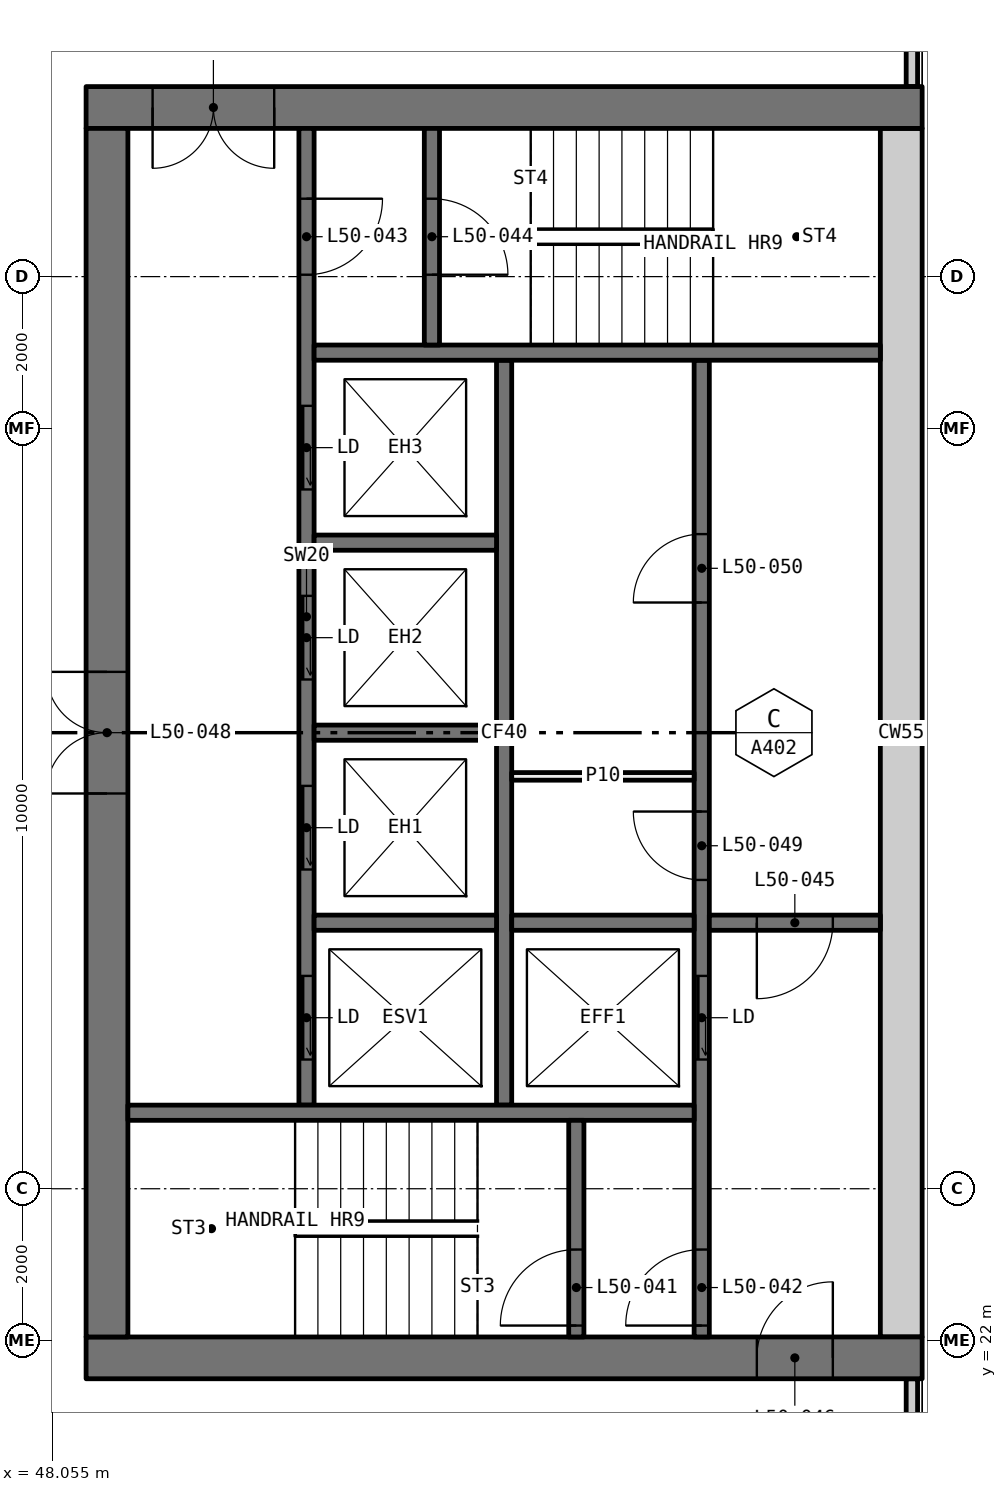
"""IFC4 building model, lengths in metres.
Left out: names, types, materials, properties, quantities, classifications, styles, units other than length and angle.
Written with IfcOpenShell. Run it as: python <this file> out.ifc"""

import sys

from ifc_helpers import new_model, si_unit, direction, frame, frame_2d, origin, place, context, subcontext, project, spatial, rectangle, extrude, element, fill, save


model = new_model("IFC4")
c1 = context("Model", 3, precision=1e-05, world=origin(), true_north=direction((0.0, 1.0)))
c2 = subcontext(c1, "Body", "Model", "MODEL_VIEW")
j1 = project(units=[si_unit("LENGTHUNIT", "METRE"), si_unit("PLANEANGLEUNIT", "RADIAN")], contexts=[c1])
p1 = place(None, origin())
s1 = spatial("IfcSite", under=j1, at=p1, CompositionType="ELEMENT")
p2 = place(p1, origin())
s2 = spatial("IfcBuilding", under=s1, at=p2, CompositionType="ELEMENT")
p3 = place(p2, frame((0.0, 0.0, 189.3)))
s3 = spatial("IfcBuildingStorey", under=s2, at=p3, CompositionType="ELEMENT", Elevation=189.3)
for number, where, z_axis, x_axis in (
    (1, (59.365, 18.71, 0.0), (0.0, 0.0, 1.0), (0.0, 1.0, 0.0)),
    (2, (59.365, 38.5, 0.0), (0.0, 0.0, 1.0), (0.0, 1.0, 0.0)),
):
    element("IfcWall", number, at=place(p3, frame(where, z_axis=z_axis, x_axis=x_axis)), inside=s3, PredefinedType="ELEMENTEDWALL", context=c2, shape_type="SweptSolid", body=[
        extrude(rectangle(XDim=2.79, YDim=0.15, at=frame_2d((1.395, 0.0))), origin(), (0.0, 0.0, 1.0), 3.05),
    ])
p4 = place(p3, frame((59.5, 21.775, 0.0), z_axis=(0.0, 0.0, 1.0), x_axis=(-1.0, 0.0, 0.0)))
e3 = element("IfcWall", 3, at=p4, inside=s3, PredefinedType="SHEAR", context=c2, shape_type="SweptSolid", body=[
    extrude(rectangle(XDim=11.0, YDim=0.55, at=frame_2d((5.5, 0.0))), origin(), (0.0, 0.0, 1.0), 3.05),
])
p5 = place(p4, frame((1.175, 0.0, 0.0)))
e4 = element("IfcOpeningElement", 4, at=p5, cuts=e3, PredefinedType="OPENING", context=c2, shape_type="SweptSolid", body=[
    extrude(rectangle(XDim=1.0, YDim=2.1, at=frame_2d((0.5, 1.05))), frame((0.0, 0.285, 0.0), z_axis=(0.0, -1.0, 0.0), x_axis=(1.0, 0.0, 0.0)), (0.0, 0.0, 1.0), 0.57),
])
p6 = place(p3, frame((59.5, 38.225, 0.0), z_axis=(0.0, 0.0, 1.0), x_axis=(-1.0, 0.0, 0.0)))
e5 = element("IfcWall", 5, at=p6, inside=s3, PredefinedType="SHEAR", context=c2, shape_type="SweptSolid", body=[
    extrude(rectangle(XDim=11.0, YDim=0.55, at=frame_2d((5.5, 0.0))), origin(), (0.0, 0.0, 1.0), 3.05),
])
p7 = place(p6, frame((8.525, 0.0, 0.0)))
e6 = element("IfcOpeningElement", 6, at=p7, cuts=e5, PredefinedType="OPENING", context=c2, shape_type="SweptSolid", body=[
    extrude(rectangle(XDim=1.6, YDim=2.1, at=frame_2d((0.8, 1.05))), frame((0.0, 0.285, 0.0), z_axis=(0.0, -1.0, 0.0), x_axis=(1.0, 0.0, 0.0)), (0.0, 0.0, 1.0), 0.57),
])
p8 = place(p3, frame((59.225, 22.05, 0.0), z_axis=(0.0, 0.0, 1.0), x_axis=(0.0, 1.0, 0.0)))
e7 = element("IfcWall", 7, at=p8, inside=s3, PredefinedType="SHEAR", context=c2, shape_type="SweptSolid", body=[
    extrude(rectangle(XDim=15.9, YDim=0.55, at=frame_2d((7.95, 0.0))), origin(), (0.0, 0.0, 1.0), 3.05),
])
p9 = place(p3, frame((48.775, 22.05, 0.0), z_axis=(0.0, 0.0, 1.0), x_axis=(0.0, 1.0, 0.0)))
e8 = element("IfcWall", 8, at=p9, inside=s3, PredefinedType="SHEAR", context=c2, shape_type="SweptSolid", body=[
    extrude(rectangle(XDim=15.9, YDim=0.55, at=frame_2d((7.95, 0.0))), origin(), (0.0, 0.0, 1.0), 3.05),
])
p10 = place(p9, frame((7.15, 0.0, 0.0)))
e9 = element("IfcOpeningElement", 9, at=p10, cuts=e8, PredefinedType="OPENING", context=c2, shape_type="SweptSolid", body=[
    extrude(rectangle(XDim=1.6, YDim=2.1, at=frame_2d((0.8, 1.05))), frame((0.0, 0.285, 0.0), z_axis=(0.0, -1.0, 0.0), x_axis=(1.0, 0.0, 0.0)), (0.0, 0.0, 1.0), 0.57),
])
p11 = place(p3, frame((56.6, 22.05, 0.0), z_axis=(0.0, 0.0, 1.0), x_axis=(0.0, 1.0, 0.0)))
e10 = element("IfcWall", 10, at=p11, inside=s3, PredefinedType="SOLIDWALL", context=c2, shape_type="SweptSolid", body=[
    extrude(rectangle(XDim=12.85, YDim=0.2, at=frame_2d((6.425, 0.0))), origin(), (0.0, 0.0, 1.0), 3.05),
])
p12 = place(p11, frame((3.65, 0.0, 0.0)))
e11 = element("IfcOpeningElement", 11, at=p12, cuts=e10, PredefinedType="OPENING", context=c2, shape_type="SweptSolid", body=[
    extrude(rectangle(XDim=1.1, YDim=2.1, at=frame_2d((0.55, 1.05))), frame((0.0, 0.11, 0.0), z_axis=(0.0, -1.0, 0.0), x_axis=(1.0, 0.0, 0.0)), (0.0, 0.0, 1.0), 0.22),
])
p13 = place(p11, frame((0.15, 0.0, 0.0)))
e12 = element("IfcOpeningElement", 12, at=p13, cuts=e10, PredefinedType="OPENING", context=c2, shape_type="SweptSolid", body=[
    extrude(rectangle(XDim=1.0, YDim=2.1, at=frame_2d((0.5, 1.05))), frame((0.0, 0.11, 0.0), z_axis=(0.0, -1.0, 0.0), x_axis=(1.0, 0.0, 0.0)), (0.0, 0.0, 1.0), 0.22),
])
p14 = place(p11, frame((6.012, 0.0, 0.0)))
e13 = element("IfcOpeningElement", 13, at=p14, cuts=e10, PredefinedType="OPENING", context=c2, shape_type="SweptSolid", body=[
    extrude(rectangle(XDim=0.9, YDim=2.1, at=frame_2d((0.45, 1.05))), frame((0.0, 0.11, 0.0), z_axis=(0.0, -1.0, 0.0), x_axis=(1.0, 0.0, 0.0)), (0.0, 0.0, 1.0), 0.22),
])
p15 = place(p11, frame((9.663, 0.0, 0.0)))
e14 = element("IfcOpeningElement", 14, at=p15, cuts=e10, PredefinedType="OPENING", context=c2, shape_type="SweptSolid", body=[
    extrude(rectangle(XDim=0.9, YDim=2.1, at=frame_2d((0.45, 1.05))), frame((0.0, 0.11, 0.0), z_axis=(0.0, -1.0, 0.0), x_axis=(1.0, 0.0, 0.0)), (0.0, 0.0, 1.0), 0.22),
])
p16 = place(p3, frame((51.4, 25.1, 0.0), z_axis=(0.0, 0.0, 1.0), x_axis=(0.0, 1.0, 0.0)))
e15 = element("IfcWall", 15, at=p16, inside=s3, PredefinedType="SOLIDWALL", context=c2, shape_type="SweptSolid", body=[
    extrude(rectangle(XDim=12.85, YDim=0.2, at=frame_2d((6.425, 0.0))), origin(), (0.0, 0.0, 1.0), 3.05),
])
p17 = place(p16, frame((0.6, 0.0, 0.0)))
e16 = element("IfcOpeningElement", 16, at=p17, cuts=e15, PredefinedType="OPENING", context=c2, shape_type="SweptSolid", body=[
    extrude(rectangle(XDim=1.1, YDim=2.1, at=frame_2d((0.55, 1.05))), frame((0.0, 0.11, 0.0), z_axis=(0.0, -1.0, 0.0), x_axis=(1.0, 0.0, 0.0)), (0.0, 0.0, 1.0), 0.22),
])
p18 = place(p16, frame((3.1, 0.0, 0.0)))
e17 = element("IfcOpeningElement", 17, at=p18, cuts=e15, PredefinedType="OPENING", context=c2, shape_type="SweptSolid", body=[
    extrude(rectangle(XDim=1.1, YDim=2.1, at=frame_2d((0.55, 1.05))), frame((0.0, 0.11, 0.0), z_axis=(0.0, -1.0, 0.0), x_axis=(1.0, 0.0, 0.0)), (0.0, 0.0, 1.0), 0.22),
])
p19 = place(p16, frame((5.6, 0.0, 0.0)))
e18 = element("IfcOpeningElement", 18, at=p19, cuts=e15, PredefinedType="OPENING", context=c2, shape_type="SweptSolid", body=[
    extrude(rectangle(XDim=1.1, YDim=2.1, at=frame_2d((0.55, 1.05))), frame((0.0, 0.11, 0.0), z_axis=(0.0, -1.0, 0.0), x_axis=(1.0, 0.0, 0.0)), (0.0, 0.0, 1.0), 0.22),
])
p20 = place(p16, frame((8.1, 0.0, 0.0)))
e19 = element("IfcOpeningElement", 19, at=p20, cuts=e15, PredefinedType="OPENING", context=c2, shape_type="SweptSolid", body=[
    extrude(rectangle(XDim=1.1, YDim=2.1, at=frame_2d((0.55, 1.05))), frame((0.0, 0.11, 0.0), z_axis=(0.0, -1.0, 0.0), x_axis=(1.0, 0.0, 0.0)), (0.0, 0.0, 1.0), 0.22),
])
p21 = place(p16, frame((10.925, 0.0, 0.0)))
e20 = element("IfcOpeningElement", 20, at=p21, cuts=e15, PredefinedType="OPENING", context=c2, shape_type="SweptSolid", body=[
    extrude(rectangle(XDim=1.0, YDim=2.1, at=frame_2d((0.5, 1.05))), frame((0.0, 0.11, 0.0), z_axis=(0.0, -1.0, 0.0), x_axis=(1.0, 0.0, 0.0)), (0.0, 0.0, 1.0), 0.22),
])
p22 = place(p3, frame((54.0, 25.1, 0.0), z_axis=(0.0, 0.0, 1.0), x_axis=(0.0, 1.0, 0.0)))
e21 = element("IfcWall", 21, at=p22, inside=s3, PredefinedType="SOLIDWALL", context=c2, shape_type="SweptSolid", body=[
    extrude(rectangle(XDim=9.8, YDim=0.2, at=frame_2d((4.9, 0.0))), origin(), (0.0, 0.0, 1.0), 3.05),
])
for number, where, z_axis, x_axis in (
    (22, (56.5, 25.0, 0.0), (0.0, 0.0, 1.0), (-1.0, 0.0, 0.0)),
    (23, (58.95, 35.0, 0.0), (0.0, 0.0, 1.0), (-1.0, 0.0, 0.0)),
):
    element("IfcWall", number, at=place(p3, frame(where, z_axis=z_axis, x_axis=x_axis)), inside=s3, PredefinedType="SOLIDWALL", context=c2, shape_type="SweptSolid", body=[
        extrude(rectangle(XDim=7.45, YDim=0.2, at=frame_2d((3.725, 0.0))), origin(), (0.0, 0.0, 1.0), 3.05),
    ])
p23 = place(p3, frame((58.95, 27.5, 0.0), z_axis=(0.0, 0.0, 1.0), x_axis=(-1.0, 0.0, 0.0)))
e24 = element("IfcWall", 24, at=p23, inside=s3, PredefinedType="SOLIDWALL", context=c2, shape_type="SweptSolid", body=[
    extrude(rectangle(XDim=2.25, YDim=0.2, at=frame_2d((1.125, 0.0))), origin(), (0.0, 0.0, 1.0), 3.05),
])
p24 = place(p23, frame((0.625, 0.0, 0.0)))
e25 = element("IfcOpeningElement", 25, at=p24, cuts=e24, PredefinedType="OPENING", context=c2, shape_type="SweptSolid", body=[
    extrude(rectangle(XDim=1.0, YDim=2.1, at=frame_2d((0.5, 1.05))), frame((0.0, 0.11, 0.0), z_axis=(0.0, -1.0, 0.0), x_axis=(1.0, 0.0, 0.0)), (0.0, 0.0, 1.0), 0.22),
])
p25 = place(p3, frame((54.95, 22.05, 0.0), z_axis=(0.0, 0.0, 1.0), x_axis=(0.0, 1.0, 0.0)))
e26 = element("IfcWall", 26, at=p25, inside=s3, PredefinedType="SOLIDWALL", context=c2, shape_type="SweptSolid", body=[
    extrude(rectangle(XDim=2.85, YDim=0.2, at=frame_2d((1.425, 0.0))), origin(), (0.0, 0.0, 1.0), 3.05),
])
p26 = place(p25, frame((0.15, 0.0, 0.0)))
e27 = element("IfcOpeningElement", 27, at=p26, cuts=e26, PredefinedType="OPENING", context=c2, shape_type="SweptSolid", body=[
    extrude(rectangle(XDim=1.0, YDim=2.1, at=frame_2d((0.5, 1.05))), frame((0.0, 0.11, 0.0), z_axis=(0.0, -1.0, 0.0), x_axis=(1.0, 0.0, 0.0)), (0.0, 0.0, 1.0), 0.22),
])
p27 = place(p3, frame((53.05, 35.1, 0.0), z_axis=(0.0, 0.0, 1.0), x_axis=(0.0, 1.0, 0.0)))
e28 = element("IfcWall", 28, at=p27, inside=s3, PredefinedType="SOLIDWALL", context=c2, shape_type="SweptSolid", body=[
    extrude(rectangle(XDim=2.85, YDim=0.2, at=frame_2d((1.425, 0.0))), origin(), (0.0, 0.0, 1.0), 3.05),
])
p28 = place(p27, frame((0.925, 0.0, 0.0)))
e29 = element("IfcOpeningElement", 29, at=p28, cuts=e28, PredefinedType="OPENING", context=c2, shape_type="SweptSolid", body=[
    extrude(rectangle(XDim=1.0, YDim=2.1, at=frame_2d((0.5, 1.05))), frame((0.0, 0.11, 0.0), z_axis=(0.0, -1.0, 0.0), x_axis=(1.0, 0.0, 0.0)), (0.0, 0.0, 1.0), 0.22),
])
for number, where, z_axis, x_axis in (
    (30, (56.5, 27.5, 0.0), (0.0, 0.0, 1.0), (-1.0, 0.0, 0.0)),
    (31, (53.9, 27.5, 0.0), (0.0, 0.0, 1.0), (-1.0, 0.0, 0.0)),
    (32, (53.9, 30.0, 0.0), (0.0, 0.0, 1.0), (-1.0, 0.0, 0.0)),
    (33, (53.9, 32.5, 0.0), (0.0, 0.0, 1.0), (-1.0, 0.0, 0.0)),
):
    element("IfcWall", number, at=place(p3, frame(where, z_axis=z_axis, x_axis=x_axis)), inside=s3, PredefinedType="SOLIDWALL", context=c2, shape_type="SweptSolid", body=[
        extrude(rectangle(XDim=2.4, YDim=0.2, at=frame_2d((1.2, 0.0))), origin(), (0.0, 0.0, 1.0), 3.05),
    ])
p29 = place(p3, frame((56.5, 29.425, 0.0), z_axis=(0.0, 0.0, 1.0), x_axis=(-1.0, 0.0, 0.0)))
e34 = element("IfcWall", 34, at=p29, inside=s3, PredefinedType="PARTITIONING", context=c2, shape_type="SweptSolid", body=[
    extrude(rectangle(XDim=2.4, YDim=0.1, at=frame_2d((1.2, 0.0))), origin(), (0.0, 0.0, 1.0), 3.05),
])
p30 = place(p17, origin())
e35 = element("IfcDoor", 35, at=p30, inside=s3, OperationType="SLIDING_TO_LEFT", PredefinedType="DOOR", context=c2, shape_type="SweptSolid", body=[
    extrude(rectangle(XDim=1.1, YDim=2.1, at=frame_2d((0.55, 1.05))), frame((0.0, 0.025, 0.0), z_axis=(0.0, -1.0, 0.0), x_axis=(1.0, 0.0, 0.0)), (0.0, 0.0, 1.0), 0.05),
])
fill(e16, e35)
p31 = place(p18, origin())
e36 = element("IfcDoor", 36, at=p31, inside=s3, OperationType="SLIDING_TO_LEFT", PredefinedType="DOOR", context=c2, shape_type="SweptSolid", body=[
    extrude(rectangle(XDim=1.1, YDim=2.1, at=frame_2d((0.55, 1.05))), frame((0.0, 0.025, 0.0), z_axis=(0.0, -1.0, 0.0), x_axis=(1.0, 0.0, 0.0)), (0.0, 0.0, 1.0), 0.05),
])
fill(e17, e36)
p32 = place(p19, origin())
e37 = element("IfcDoor", 37, at=p32, inside=s3, OperationType="SLIDING_TO_LEFT", PredefinedType="DOOR", context=c2, shape_type="SweptSolid", body=[
    extrude(rectangle(XDim=1.1, YDim=2.1, at=frame_2d((0.55, 1.05))), frame((0.0, 0.025, 0.0), z_axis=(0.0, -1.0, 0.0), x_axis=(1.0, 0.0, 0.0)), (0.0, 0.0, 1.0), 0.05),
])
fill(e18, e37)
p33 = place(p20, origin())
e38 = element("IfcDoor", 38, at=p33, inside=s3, OperationType="SLIDING_TO_LEFT", PredefinedType="DOOR", context=c2, shape_type="SweptSolid", body=[
    extrude(rectangle(XDim=1.1, YDim=2.1, at=frame_2d((0.55, 1.05))), frame((0.0, 0.025, 0.0), z_axis=(0.0, -1.0, 0.0), x_axis=(1.0, 0.0, 0.0)), (0.0, 0.0, 1.0), 0.05),
])
fill(e19, e38)
p34 = place(p12, origin())
e39 = element("IfcDoor", 39, at=p34, inside=s3, OperationType="SLIDING_TO_LEFT", PredefinedType="DOOR", context=c2, shape_type="SweptSolid", body=[
    extrude(rectangle(XDim=1.1, YDim=2.1, at=frame_2d((0.55, 1.05))), frame((0.0, 0.025, 0.0), z_axis=(0.0, -1.0, 0.0), x_axis=(1.0, 0.0, 0.0)), (0.0, 0.0, 1.0), 0.05),
])
fill(e11, e39)
p35 = place(p26, origin())
e40 = element("IfcDoor", 40, at=p35, inside=s3, OperationType="SINGLE_SWING_RIGHT", PredefinedType="DOOR", context=c2, shape_type="SweptSolid", body=[
    extrude(rectangle(XDim=1.0, YDim=2.1, at=frame_2d((0.5, 1.05))), frame((0.0, 0.025, 0.0), z_axis=(0.0, -1.0, 0.0), x_axis=(1.0, 0.0, 0.0)), (0.0, 0.0, 1.0), 0.05),
])
fill(e27, e40)
p36 = place(p13, origin())
e41 = element("IfcDoor", 41, at=p36, inside=s3, OperationType="SINGLE_SWING_RIGHT", PredefinedType="DOOR", context=c2, shape_type="SweptSolid", body=[
    extrude(rectangle(XDim=1.0, YDim=2.1, at=frame_2d((0.5, 1.05))), frame((0.0, 0.025, 0.0), z_axis=(0.0, -1.0, 0.0), x_axis=(1.0, 0.0, 0.0)), (0.0, 0.0, 1.0), 0.05),
])
fill(e12, e41)
p37 = place(p21, frame((1.0, 0.0, 0.0), x_axis=(-1.0, 0.0, 0.0)))
e42 = element("IfcDoor", 42, at=p37, inside=s3, OperationType="SINGLE_SWING_RIGHT", PredefinedType="DOOR", context=c2, shape_type="SweptSolid", body=[
    extrude(rectangle(XDim=1.0, YDim=2.1, at=frame_2d((0.5, 1.05))), frame((0.0, 0.025, 0.0), z_axis=(0.0, -1.0, 0.0), x_axis=(1.0, 0.0, 0.0)), (0.0, 0.0, 1.0), 0.05),
])
fill(e20, e42)
p38 = place(p28, frame((1.0, 0.0, 0.0), x_axis=(-1.0, 0.0, 0.0)))
e43 = element("IfcDoor", 43, at=p38, inside=s3, OperationType="SINGLE_SWING_LEFT", PredefinedType="DOOR", context=c2, shape_type="SweptSolid", body=[
    extrude(rectangle(XDim=1.0, YDim=2.1, at=frame_2d((0.5, 1.05))), frame((0.0, 0.025, 0.0), z_axis=(0.0, -1.0, 0.0), x_axis=(1.0, 0.0, 0.0)), (0.0, 0.0, 1.0), 0.05),
])
fill(e29, e43)
p39 = place(p24, origin())
e44 = element("IfcDoor", 44, at=p39, inside=s3, OperationType="SINGLE_SWING_LEFT", PredefinedType="DOOR", context=c2, shape_type="SweptSolid", body=[
    extrude(rectangle(XDim=1.0, YDim=2.1, at=frame_2d((0.5, 1.05))), frame((0.0, 0.025, 0.0), z_axis=(0.0, -1.0, 0.0), x_axis=(1.0, 0.0, 0.0)), (0.0, 0.0, 1.0), 0.05),
])
fill(e25, e44)
p40 = place(p5, frame((1.0, 0.0, 0.0), x_axis=(-1.0, 0.0, 0.0)))
e45 = element("IfcDoor", 45, at=p40, inside=s3, OperationType="SINGLE_SWING_LEFT", PredefinedType="DOOR", context=c2, shape_type="SweptSolid", body=[
    extrude(rectangle(XDim=1.0, YDim=2.1, at=frame_2d((0.5, 1.05))), frame((0.0, 0.025, 0.0), z_axis=(0.0, -1.0, 0.0), x_axis=(1.0, 0.0, 0.0)), (0.0, 0.0, 1.0), 0.05),
])
fill(e4, e45)
p41 = place(p7, origin())
e46 = element("IfcDoor", 46, at=p41, inside=s3, OperationType="DOUBLE_DOOR_SINGLE_SWING", PredefinedType="DOOR", context=c2, shape_type="SweptSolid", body=[
    extrude(rectangle(XDim=1.6, YDim=2.1, at=frame_2d((0.8, 1.05))), frame((0.0, 0.025, 0.0), z_axis=(0.0, -1.0, 0.0), x_axis=(1.0, 0.0, 0.0)), (0.0, 0.0, 1.0), 0.05),
])
fill(e6, e46)
p42 = place(p10, origin())
e47 = element("IfcDoor", 47, at=p42, inside=s3, OperationType="DOUBLE_DOOR_SINGLE_SWING", PredefinedType="DOOR", context=c2, shape_type="SweptSolid", body=[
    extrude(rectangle(XDim=1.6, YDim=2.1, at=frame_2d((0.8, 1.05))), frame((0.0, 0.025, 0.0), z_axis=(0.0, -1.0, 0.0), x_axis=(1.0, 0.0, 0.0)), (0.0, 0.0, 1.0), 0.05),
])
fill(e9, e47)
p43 = place(p14, origin())
e48 = element("IfcDoor", 48, at=p43, inside=s3, OperationType="SINGLE_SWING_LEFT", PredefinedType="DOOR", context=c2, shape_type="SweptSolid", body=[
    extrude(rectangle(XDim=0.9, YDim=2.1, at=frame_2d((0.45, 1.05))), frame((0.0, 0.025, 0.0), z_axis=(0.0, -1.0, 0.0), x_axis=(1.0, 0.0, 0.0)), (0.0, 0.0, 1.0), 0.05),
])
fill(e13, e48)
p44 = place(p15, origin())
e49 = element("IfcDoor", 49, at=p44, inside=s3, OperationType="SINGLE_SWING_RIGHT", PredefinedType="DOOR", context=c2, shape_type="SweptSolid", body=[
    extrude(rectangle(XDim=0.9, YDim=2.1, at=frame_2d((0.45, 1.05))), frame((0.0, 0.025, 0.0), z_axis=(0.0, -1.0, 0.0), x_axis=(1.0, 0.0, 0.0)), (0.0, 0.0, 1.0), 0.05),
])
fill(e14, e49)
save(model, sys.argv[1])
